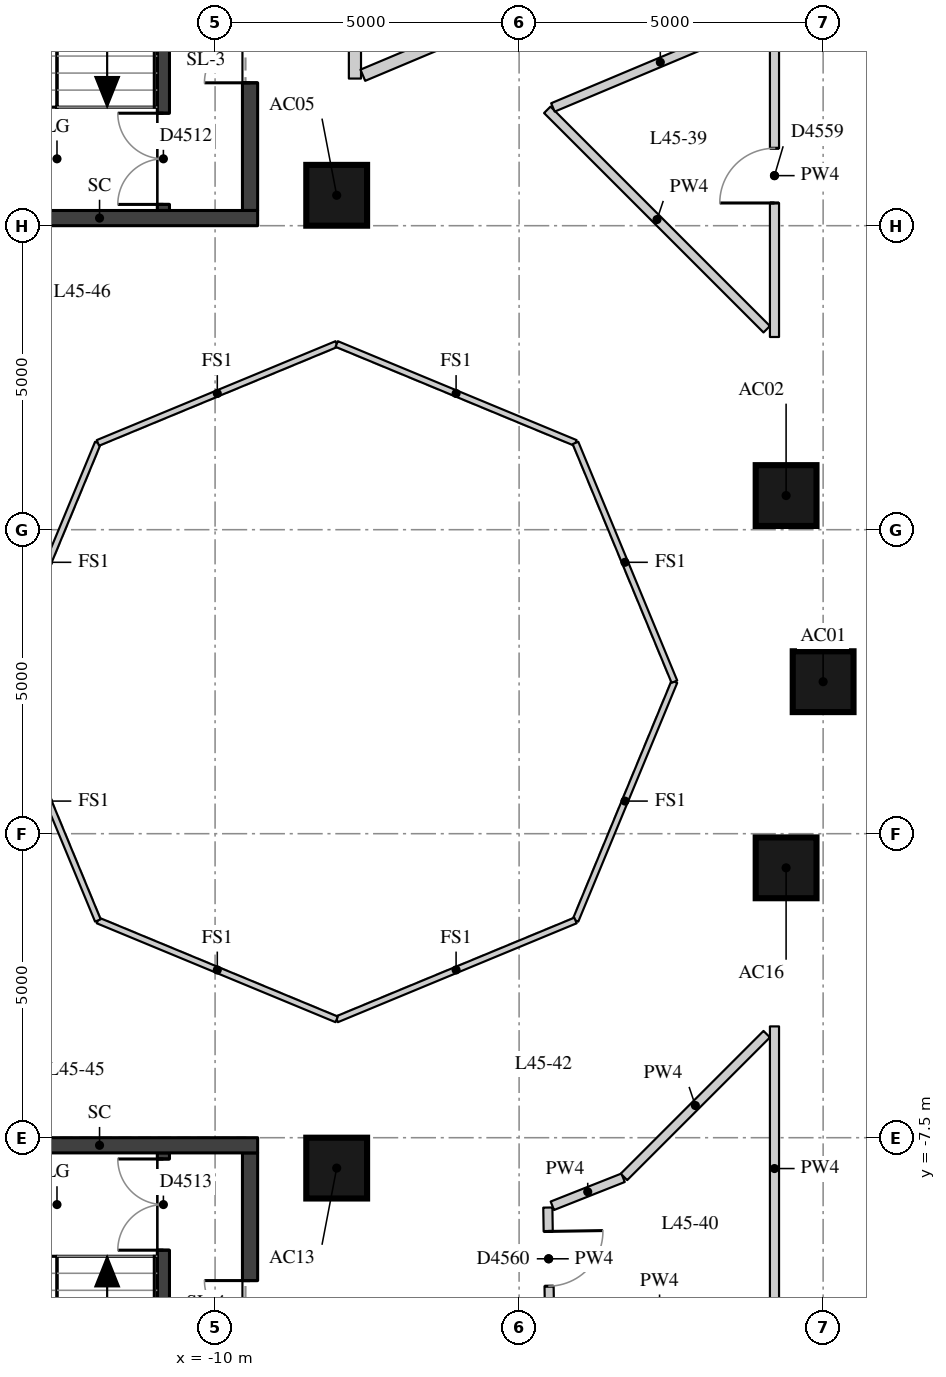
"""IFC4 building model, lengths in metres.
Left out: names, types, materials, properties, quantities, classifications, styles, units other than length and angle.
Written with IfcOpenShell. Run it as: python <this file> out.ifc"""

import sys

from ifc_helpers import new_model, si_unit, direction, frame, frame_2d, origin, origin_2d, place, context, subcontext, project, spatial, rectangle, extrude, element, fill, save


model = new_model("IFC4")
c1 = context("Model", 3, precision=1e-05, world=origin(), true_north=direction((0.0, 1.0)))
c2 = subcontext(c1, "Body", "Model", "MODEL_VIEW")
j1 = project(units=[si_unit("LENGTHUNIT", "METRE"), si_unit("PLANEANGLEUNIT", "RADIAN")], contexts=[c1])
p1 = place(None, origin())
s1 = spatial("IfcSite", under=j1, at=p1, CompositionType="ELEMENT")
p2 = place(p1, origin())
s2 = spatial("IfcBuilding", under=s1, at=p2, CompositionType="ELEMENT")
p3 = place(p2, frame((0.0, 0.0, 161.6)))
s3 = spatial("IfcBuildingStorey", under=s2, at=p3, CompositionType="ELEMENT", Elevation=161.6)
for number, where, z_axis, x_axis in (
    (1, (0.0, 0.0, 0.0), (0.0, 0.0, 1.0), (1.0, 0.0, 0.0)),
    (2, (-0.609, 3.062, 0.0), (0.0, 0.0, 1.0), (1.0, 0.0, 0.0)),
    (3, (-8.0, 8.0, 0.0), (0.0, 0.0, 1.0), (1.0, 0.0, 0.0)),
    (4, (-8.0, -8.0, 0.0), (0.0, 0.0, 1.0), (1.0, 0.0, 0.0)),
    (5, (-0.609, -3.062, 0.0), (0.0, 0.0, 1.0), (1.0, 0.0, 0.0)),
):
    element("IfcColumn", number, at=place(p3, frame(where, z_axis=z_axis, x_axis=x_axis)), inside=s3, PredefinedType="COLUMN", context=c2, shape_type="SweptSolid", body=[
        extrude(rectangle(XDim=1.0, YDim=1.0, at=origin_2d()), origin(), (0.0, 0.0, 1.0), 3.3),
    ])
p4 = place(p3, frame((-10.85, 7.75, 0.0), z_axis=(0.0, 0.0, 1.0), x_axis=(0.0, 1.0, 0.0)))
e6 = element("IfcWall", 6, at=p4, inside=s3, PredefinedType="SHEAR", context=c2, shape_type="SweptSolid", body=[
    extrude(rectangle(XDim=6.0, YDim=0.2, at=frame_2d((3.0, 0.0))), origin(), (0.0, 0.0, 1.0), 3.02),
])
p5 = place(p4, frame((0.1, 0.0, 0.0)))
e7 = element("IfcOpeningElement", 7, at=p5, cuts=e6, PredefinedType="OPENING", context=c2, shape_type="SweptSolid", body=[
    extrude(rectangle(XDim=1.5, YDim=2.1, at=frame_2d((0.75, 1.05))), frame((0.0, 0.11, 0.0), z_axis=(0.0, -1.0, 0.0), x_axis=(1.0, 0.0, 0.0)), (0.0, 0.0, 1.0), 0.22),
])
p6 = place(p3, frame((-10.85, -13.75, 0.0), z_axis=(0.0, 0.0, 1.0), x_axis=(0.0, 1.0, 0.0)))
e8 = element("IfcWall", 8, at=p6, inside=s3, PredefinedType="SHEAR", context=c2, shape_type="SweptSolid", body=[
    extrude(rectangle(XDim=6.0, YDim=0.2, at=frame_2d((3.0, 0.0))), origin(), (0.0, 0.0, 1.0), 3.02),
])
p7 = place(p6, frame((4.4, 0.0, 0.0)))
e9 = element("IfcOpeningElement", 9, at=p7, cuts=e8, PredefinedType="OPENING", context=c2, shape_type="SweptSolid", body=[
    extrude(rectangle(XDim=1.5, YDim=2.1, at=frame_2d((0.75, 1.05))), frame((0.0, 0.11, 0.0), z_axis=(0.0, -1.0, 0.0), x_axis=(1.0, 0.0, 0.0)), (0.0, 0.0, 1.0), 0.22),
])
p8 = place(p3, frame((-9.425, 7.75, -0.28), z_axis=(0.0, 0.0, 1.0), x_axis=(0.0, 1.0, 0.0)))
e10 = element("IfcWall", 10, at=p8, inside=s3, PredefinedType="SHEAR", context=c2, shape_type="SweptSolid", body=[
    extrude(rectangle(XDim=6.0, YDim=0.25, at=frame_2d((3.0, 0.0))), origin(), (0.0, 0.0, 1.0), 3.3),
])
p9 = place(p8, frame((2.1, 0.0, 0.28)))
e11 = element("IfcOpeningElement", 11, at=p9, cuts=e10, PredefinedType="OPENING", context=c2, shape_type="SweptSolid", body=[
    extrude(rectangle(XDim=1.5, YDim=2.1, at=frame_2d((0.75, 1.05))), frame((0.0, 0.135, 0.0), z_axis=(0.0, -1.0, 0.0), x_axis=(1.0, 0.0, 0.0)), (0.0, 0.0, 1.0), 0.27),
])
p10 = place(p3, frame((-14.5, 7.625, -0.28), z_axis=(0.0, 0.0, 1.0), x_axis=(1.0, 0.0, 0.0)))
e12 = element("IfcWall", 12, at=p10, inside=s3, PredefinedType="SHEAR", context=c2, shape_type="SweptSolid", body=[
    extrude(rectangle(XDim=5.2, YDim=0.25, at=frame_2d((2.6, 0.0))), origin(), (0.0, 0.0, 1.0), 3.3),
])
p11 = place(p3, frame((-9.425, -13.75, -0.28), z_axis=(0.0, 0.0, 1.0), x_axis=(0.0, 1.0, 0.0)))
e13 = element("IfcWall", 13, at=p11, inside=s3, PredefinedType="SHEAR", context=c2, shape_type="SweptSolid", body=[
    extrude(rectangle(XDim=6.0, YDim=0.25, at=frame_2d((3.0, 0.0))), origin(), (0.0, 0.0, 1.0), 3.3),
])
p12 = place(p11, frame((2.4, 0.0, 0.28)))
e14 = element("IfcOpeningElement", 14, at=p12, cuts=e13, PredefinedType="OPENING", context=c2, shape_type="SweptSolid", body=[
    extrude(rectangle(XDim=1.5, YDim=2.1, at=frame_2d((0.75, 1.05))), frame((0.0, 0.135, 0.0), z_axis=(0.0, -1.0, 0.0), x_axis=(1.0, 0.0, 0.0)), (0.0, 0.0, 1.0), 0.27),
])
p13 = place(p3, frame((-14.5, -7.625, -0.28), z_axis=(0.0, 0.0, 1.0), x_axis=(1.0, 0.0, 0.0)))
e15 = element("IfcWall", 15, at=p13, inside=s3, PredefinedType="SHEAR", context=c2, shape_type="SweptSolid", body=[
    extrude(rectangle(XDim=5.2, YDim=0.25, at=frame_2d((2.6, 0.0))), origin(), (0.0, 0.0, 1.0), 3.3),
])
p14 = place(p3, frame((-7.7, 15.295, 0.0), z_axis=(0.0, 0.0, 1.0), x_axis=(0.0, -1.0, 0.0)))
e16 = element("IfcWall", 16, at=p14, inside=s3, PredefinedType="PARTITIONING", context=c2, shape_type="SweptSolid", body=[
    extrude(rectangle(XDim=5.375, YDim=0.2, at=frame_2d((2.688, 0.0))), origin(), (0.0, 0.0, 1.0), 3.02),
])
p15 = place(p14, frame((0.57, 0.0, 0.0)))
e17 = element("IfcOpeningElement", 17, at=p15, cuts=e16, PredefinedType="OPENING", context=c2, shape_type="SweptSolid", body=[
    extrude(rectangle(XDim=1.1, YDim=2.1, at=frame_2d((0.55, 1.05))), frame((0.0, 0.11, 0.0), z_axis=(0.0, -1.0, 0.0), x_axis=(1.0, 0.0, 0.0)), (0.0, 0.0, 1.0), 0.22),
])
p16 = place(p3, frame((-7.57, 9.975, 0.0), z_axis=(0.0, 0.0, 1.0), x_axis=(0.921815879705, 0.387628022624, 0.0)))
e18 = element("IfcWall", 18, at=p16, inside=s3, PredefinedType="PARTITIONING", context=c2, shape_type="SweptSolid", body=[
    extrude(rectangle(XDim=8.321, YDim=0.2, at=frame_2d((4.16, 0.0))), origin(), (0.0, 0.0, 1.0), 3.02),
])
p17 = place(p16, frame((4.721, 0.0, 0.0)))
e19 = element("IfcOpeningElement", 19, at=p17, cuts=e18, PredefinedType="OPENING", context=c2, shape_type="SweptSolid", body=[
    extrude(rectangle(XDim=1.8, YDim=2.1, at=frame_2d((0.9, 1.05))), frame((0.0, 0.11, 0.0), z_axis=(0.0, -1.0, 0.0), x_axis=(1.0, 0.0, 0.0)), (0.0, 0.0, 1.0), 0.22),
])
p18 = place(p3, frame((-0.8, 10.977, 0.0), z_axis=(0.0, 0.0, 1.0), x_axis=(0.0, -1.0, 0.0)))
e20 = element("IfcWall", 20, at=p18, inside=s3, PredefinedType="PARTITIONING", context=c2, shape_type="SweptSolid", body=[
    extrude(rectangle(XDim=5.308, YDim=0.15, at=frame_2d((2.654, 0.0))), origin(), (0.0, 0.0, 1.0), 3.02),
])
p19 = place(p18, frame((2.204, 0.0, 0.0)))
e21 = element("IfcOpeningElement", 21, at=p19, cuts=e20, PredefinedType="OPENING", context=c2, shape_type="SweptSolid", body=[
    extrude(rectangle(XDim=0.9, YDim=2.1, at=frame_2d((0.45, 1.05))), frame((0.0, 0.085, 0.0), z_axis=(0.0, -1.0, 0.0), x_axis=(1.0, 0.0, 0.0)), (0.0, 0.0, 1.0), 0.17),
])
p20 = place(p3, frame((-0.927, 5.797, 0.0), z_axis=(0.0, 0.0, 1.0), x_axis=(-0.707106781187, 0.707106781187, 0.0)))
e22 = element("IfcWall", 22, at=p20, inside=s3, PredefinedType="PARTITIONING", context=c2, shape_type="SweptSolid", body=[
    extrude(rectangle(XDim=5.104, YDim=0.15, at=frame_2d((2.552, 0.0))), origin(), (0.0, 0.0, 1.0), 3.02),
])
p21 = place(p3, frame((-4.444, 9.445, 0.0), z_axis=(0.0, 0.0, 1.0), x_axis=(0.921822351054, 0.387612632788, 0.0)))
e23 = element("IfcWall", 23, at=p21, inside=s3, PredefinedType="PARTITIONING", context=c2, shape_type="SweptSolid", body=[
    extrude(rectangle(XDim=3.832, YDim=0.15, at=frame_2d((1.916, 0.0))), origin(), (0.0, 0.0, 1.0), 3.02),
])
p22 = place(p3, frame((-0.8, -5.669, 0.0), z_axis=(0.0, 0.0, 1.0), x_axis=(0.0, -1.0, 0.0)))
e24 = element("IfcWall", 24, at=p22, inside=s3, PredefinedType="PARTITIONING", context=c2, shape_type="SweptSolid", body=[
    extrude(rectangle(XDim=4.676, YDim=0.15, at=frame_2d((2.338, 0.0))), origin(), (0.0, 0.0, 1.0), 3.02),
])
p23 = place(p3, frame((-4.501, -10.334, 0.0), z_axis=(0.0, 0.0, 1.0), x_axis=(-0.015785981736, 0.999875393627, 0.0)))
e25 = element("IfcWall", 25, at=p23, inside=s3, PredefinedType="PARTITIONING", context=c2, shape_type="SweptSolid", body=[
    extrude(rectangle(XDim=1.686, YDim=0.15, at=frame_2d((0.843, 0.0))), origin(), (0.0, 0.0, 1.0), 3.02),
])
p24 = place(p23, frame((0.393, 0.0, 0.0)))
e26 = element("IfcOpeningElement", 26, at=p24, cuts=e25, PredefinedType="OPENING", context=c2, shape_type="SweptSolid", body=[
    extrude(rectangle(XDim=0.9, YDim=2.1, at=frame_2d((0.45, 1.05))), frame((0.0, 0.085, 0.0), z_axis=(0.0, -1.0, 0.0), x_axis=(1.0, 0.0, 0.0)), (0.0, 0.0, 1.0), 0.17),
])
p25 = place(p3, frame((-4.453, -8.62, 0.0), z_axis=(0.0, 0.0, 1.0), x_axis=(0.929802441214, 0.36805899026, 0.0)))
e27 = element("IfcWall", 27, at=p25, inside=s3, PredefinedType="PARTITIONING", context=c2, shape_type="SweptSolid", body=[
    extrude(rectangle(XDim=1.252, YDim=0.15, at=frame_2d((0.626, 0.0))), origin(), (0.0, 0.0, 1.0), 3.02),
])
p26 = place(p3, frame((-3.275, -8.145, 0.0), z_axis=(0.0, 0.0, 1.0), x_axis=(0.707106781187, 0.707106781187, 0.0)))
e28 = element("IfcWall", 28, at=p26, inside=s3, PredefinedType="PARTITIONING", context=c2, shape_type="SweptSolid", body=[
    extrude(rectangle(XDim=3.32, YDim=0.15, at=frame_2d((1.66, 0.0))), origin(), (0.0, 0.0, 1.0), 3.02),
])
for number, where, z_axis, x_axis in (
    (29, (-2.446, 0.0, 0.0), (0.0, 0.0, 1.0), (-0.383, -0.924, 0.0)),
    (30, (-4.073, -3.927, 0.0), (0.0, 0.0, 1.0), (-0.924, -0.383, 0.0)),
    (31, (-8.0, -5.554, 0.0), (0.0, 0.0, 1.0), (-0.924, 0.383, 0.0)),
    (32, (-11.927, -3.927, 0.0), (0.0, 0.0, 1.0), (-0.383, 0.924, 0.0)),
    (33, (-13.554, 0.0, 0.0), (0.0, 0.0, 1.0), (0.383, 0.924, 0.0)),
    (34, (-11.927, 3.927, 0.0), (0.0, 0.0, 1.0), (0.924, 0.383, 0.0)),
    (35, (-8.0, 5.554, 0.0), (0.0, 0.0, 1.0), (0.924, -0.383, 0.0)),
    (36, (-4.073, 3.927, 0.0), (0.0, 0.0, 1.0), (0.383, -0.924, 0.0)),
):
    element("IfcWall", number, at=place(p3, frame(where, z_axis=z_axis, x_axis=x_axis)), inside=s3, PredefinedType="PARTITIONING", context=c2, shape_type="SweptSolid", body=[
        extrude(rectangle(XDim=4.251, YDim=0.1, at=frame_2d((2.125, 0.0))), origin(), (0.0, 0.0, 1.0), 3.02),
    ])
p27 = place(p5, origin())
e37 = element("IfcDoor", 37, at=p27, inside=s3, OperationType="DOUBLE_DOOR_SINGLE_SWING", PredefinedType="DOOR", context=c2, shape_type="SweptSolid", body=[
    extrude(rectangle(XDim=1.5, YDim=2.1, at=frame_2d((0.75, 1.05))), frame((0.0, 0.025, 0.0), z_axis=(0.0, -1.0, 0.0), x_axis=(1.0, 0.0, 0.0)), (0.0, 0.0, 1.0), 0.05),
])
fill(e7, e37)
p28 = place(p7, origin())
e38 = element("IfcDoor", 38, at=p28, inside=s3, OperationType="DOUBLE_DOOR_SINGLE_SWING", PredefinedType="DOOR", context=c2, shape_type="SweptSolid", body=[
    extrude(rectangle(XDim=1.5, YDim=2.1, at=frame_2d((0.75, 1.05))), frame((0.0, 0.025, 0.0), z_axis=(0.0, -1.0, 0.0), x_axis=(1.0, 0.0, 0.0)), (0.0, 0.0, 1.0), 0.05),
])
fill(e9, e38)
p29 = place(p9, origin())
e39 = element("IfcDoor", 39, at=p29, inside=s3, OperationType="DOUBLE_DOOR_SINGLE_SWING", PredefinedType="DOOR", context=c2, shape_type="SweptSolid", body=[
    extrude(rectangle(XDim=1.5, YDim=2.1, at=frame_2d((0.75, 1.05))), frame((0.0, 0.025, 0.0), z_axis=(0.0, -1.0, 0.0), x_axis=(1.0, 0.0, 0.0)), (0.0, 0.0, 1.0), 0.05),
])
fill(e11, e39)
p30 = place(p12, origin())
e40 = element("IfcDoor", 40, at=p30, inside=s3, OperationType="DOUBLE_DOOR_SINGLE_SWING", PredefinedType="DOOR", context=c2, shape_type="SweptSolid", body=[
    extrude(rectangle(XDim=1.5, YDim=2.1, at=frame_2d((0.75, 1.05))), frame((0.0, 0.025, 0.0), z_axis=(0.0, -1.0, 0.0), x_axis=(1.0, 0.0, 0.0)), (0.0, 0.0, 1.0), 0.05),
])
fill(e14, e40)
p31 = place(p19, origin())
e41 = element("IfcDoor", 41, at=p31, inside=s3, OperationType="SINGLE_SWING_LEFT", PredefinedType="DOOR", context=c2, shape_type="SweptSolid", body=[
    extrude(rectangle(XDim=0.9, YDim=2.1, at=frame_2d((0.45, 1.05))), frame((0.0, 0.025, 0.0), z_axis=(0.0, -1.0, 0.0), x_axis=(1.0, 0.0, 0.0)), (0.0, 0.0, 1.0), 0.05),
])
fill(e21, e41)
p32 = place(p24, origin())
e42 = element("IfcDoor", 42, at=p32, inside=s3, OperationType="SINGLE_SWING_LEFT", PredefinedType="DOOR", context=c2, shape_type="SweptSolid", body=[
    extrude(rectangle(XDim=0.9, YDim=2.1, at=frame_2d((0.45, 1.05))), frame((0.0, 0.025, 0.0), z_axis=(0.0, -1.0, 0.0), x_axis=(1.0, 0.0, 0.0)), (0.0, 0.0, 1.0), 0.05),
])
fill(e26, e42)
save(model, sys.argv[1])
